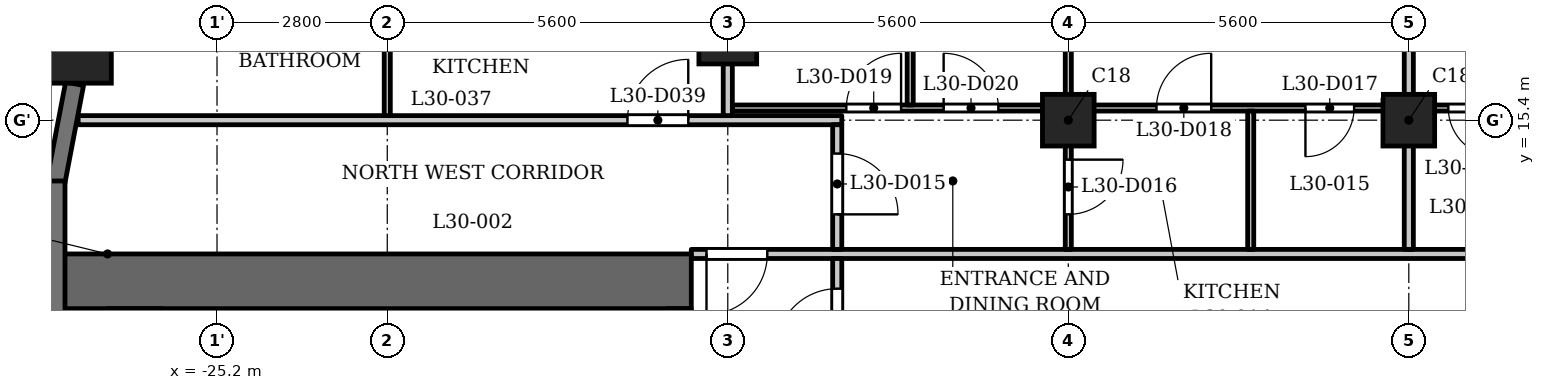
"""IFC4 building model, lengths in metres.
Left out: names, types, materials, properties, quantities, classifications, styles, units other than length and angle.
Written with IfcOpenShell. Run it as: python <this file> out.ifc"""

import sys

from ifc_helpers import new_model, si_unit, direction, frame, frame_2d, origin, origin_2d, place, context, subcontext, project, spatial, rectangle, extrude, element, fill, save


model = new_model("IFC4")
c1 = context("Model", 3, precision=1e-05, world=origin(), true_north=direction((0.0, 1.0)))
c2 = subcontext(c1, "Body", "Model", "MODEL_VIEW")
j1 = project(units=[si_unit("LENGTHUNIT", "METRE"), si_unit("PLANEANGLEUNIT", "RADIAN")], contexts=[c1])
p1 = place(None, origin())
s1 = spatial("IfcSite", under=j1, at=p1, CompositionType="ELEMENT")
p2 = place(p1, origin())
s2 = spatial("IfcBuilding", under=s1, at=p2, CompositionType="ELEMENT")
p3 = place(p2, frame((0.0, 0.0, 118.3)))
s3 = spatial("IfcBuildingStorey", under=s2, at=p3, CompositionType="ELEMENT", Elevation=118.3)
p4 = place(p3, frame((-27.538, 16.609, 0.0), z_axis=(0.0, 0.0, 1.0), x_axis=(1.0, 0.0, 0.0)))
e1 = element("IfcColumn", 1, at=p4, inside=s3, PredefinedType="COLUMN", context=c2, shape_type="SweptSolid", body=[
    extrude(rectangle(XDim=1.2, YDim=1.2, at=origin_2d()), origin(), (0.0, 0.0, 1.0), 3.5),
])
p5 = place(p3, frame((-16.8, 16.8, 0.0), z_axis=(0.0, 0.0, 1.0), x_axis=(1.0, 0.0, 0.0)))
e2 = element("IfcColumn", 2, at=p5, inside=s3, PredefinedType="COLUMN", context=c2, shape_type="SweptSolid", body=[
    extrude(rectangle(XDim=0.95, YDim=0.95, at=origin_2d()), origin(), (0.0, 0.0, 1.0), 3.5),
])
for number, where, z_axis, x_axis in (
    (3, (-11.2, 15.4, 0.0), (0.0, 0.0, 1.0), (1.0, 0.0, 0.0)),
    (4, (-5.6, 15.4, 0.0), (0.0, 0.0, 1.0), (1.0, 0.0, 0.0)),
):
    element("IfcColumn", number, at=place(p3, frame(where, z_axis=z_axis, x_axis=x_axis)), inside=s3, PredefinedType="COLUMN", context=c2, shape_type="SweptSolid", body=[
        extrude(rectangle(XDim=0.85, YDim=0.85, at=origin_2d()), origin(), (0.0, 0.0, 1.0), 3.5),
    ])
p6 = place(p3, frame((-27.542, 15.999, 0.0), z_axis=(0.0, 0.0, 1.0), x_axis=(-0.187349172861, -0.982293381546, 0.0)))
e5 = element("IfcWall", 5, at=p6, inside=s3, PredefinedType="SOLIDWALL", context=c2, shape_type="SweptSolid", body=[
    extrude(rectangle(XDim=1.656, YDim=0.3, at=frame_2d((0.828, 0.0))), origin(), (0.0, 0.0, 1.0), 2.4),
])
p7 = place(p3, frame((-27.85, 14.4, 0.0), z_axis=(0.0, 0.0, 1.0), x_axis=(0.0, -1.0, 0.0)))
e6 = element("IfcWall", 6, at=p7, inside=s3, PredefinedType="SOLIDWALL", context=c2, shape_type="SweptSolid", body=[
    extrude(rectangle(XDim=2.6, YDim=0.3, at=frame_2d((1.3, 0.0))), origin(), (0.0, 0.0, 1.0), 2.4),
])
p8 = place(p3, frame((-17.4, 12.75, 0.0), z_axis=(0.0, 0.0, 1.0), x_axis=(-1.0, 0.0, 0.0)))
e7 = element("IfcWall", 7, at=p8, inside=s3, PredefinedType="SHEAR", context=c2, shape_type="SweptSolid", body=[
    extrude(rectangle(XDim=10.4, YDim=0.9, at=frame_2d((5.2, 0.0))), origin(), (0.0, 0.0, 1.0), 3.2),
])
p9 = place(p3, frame((-17.6, -12.3, 0.0), z_axis=(0.0, 0.0, 1.0), x_axis=(0.0, 1.0, 0.0)))
e8 = element("IfcWall", 8, at=p9, inside=s3, PredefinedType="SHEAR", context=c2, shape_type="SweptSolid", body=[
    extrude(rectangle(XDim=24.6, YDim=0.4, at=frame_2d((12.3, 0.0))), origin(), (0.0, 0.0, 1.0), 3.2),
])
p10 = place(p9, frame((6.0, 0.0, 0.0)))
e9 = element("IfcOpeningElement", 9, at=p10, cuts=e8, PredefinedType="OPENING", context=c2, shape_type="SweptSolid", body=[
    extrude(rectangle(XDim=1.1, YDim=2.1, at=frame_2d((0.55, 1.05))), frame((0.0, 0.21, 0.0), z_axis=(0.0, -1.0, 0.0), x_axis=(1.0, 0.0, 0.0)), (0.0, 0.0, 1.0), 0.42),
])
p11 = place(p9, frame((8.4, 0.0, 0.0)))
e10 = element("IfcOpeningElement", 10, at=p11, cuts=e8, PredefinedType="OPENING", context=c2, shape_type="SweptSolid", body=[
    extrude(rectangle(XDim=1.1, YDim=2.1, at=frame_2d((0.55, 1.05))), frame((0.0, 0.21, 0.0), z_axis=(0.0, -1.0, 0.0), x_axis=(1.0, 0.0, 0.0)), (0.0, 0.0, 1.0), 0.42),
])
p12 = place(p9, frame((10.8, 0.0, 0.0)))
e11 = element("IfcOpeningElement", 11, at=p12, cuts=e8, PredefinedType="OPENING", context=c2, shape_type="SweptSolid", body=[
    extrude(rectangle(XDim=1.1, YDim=2.1, at=frame_2d((0.55, 1.05))), frame((0.0, 0.21, 0.0), z_axis=(0.0, -1.0, 0.0), x_axis=(1.0, 0.0, 0.0)), (0.0, 0.0, 1.0), 0.42),
])
p13 = place(p9, frame((16.75, 0.0, 0.0)))
e12 = element("IfcOpeningElement", 12, at=p13, cuts=e8, PredefinedType="OPENING", context=c2, shape_type="SweptSolid", body=[
    extrude(rectangle(XDim=0.9, YDim=2.1, at=frame_2d((0.45, 1.05))), frame((0.0, 0.21, 0.0), z_axis=(0.0, -1.0, 0.0), x_axis=(1.0, 0.0, 0.0)), (0.0, 0.0, 1.0), 0.42),
])
p14 = place(p9, frame((22.8, 0.0, 0.0)))
e13 = element("IfcOpeningElement", 13, at=p14, cuts=e8, PredefinedType="OPENING", context=c2, shape_type="SweptSolid", body=[
    extrude(rectangle(XDim=1.1, YDim=2.1, at=frame_2d((0.55, 1.05))), frame((0.0, 0.21, 0.0), z_axis=(0.0, -1.0, 0.0), x_axis=(1.0, 0.0, 0.0)), (0.0, 0.0, 1.0), 0.42),
])
p15 = place(p9, frame((0.7, 0.0, 0.0)))
e14 = element("IfcOpeningElement", 14, at=p15, cuts=e8, PredefinedType="OPENING", context=c2, shape_type="SweptSolid", body=[
    extrude(rectangle(XDim=1.1, YDim=2.1, at=frame_2d((0.55, 1.05))), frame((0.0, 0.21, 0.0), z_axis=(0.0, -1.0, 0.0), x_axis=(1.0, 0.0, 0.0)), (0.0, 0.0, 1.0), 0.42),
])
p16 = place(p9, frame((12.775, 0.0, 0.0)))
e15 = element("IfcOpeningElement", 15, at=p16, cuts=e8, PredefinedType="OPENING", context=c2, shape_type="SweptSolid", body=[
    extrude(rectangle(XDim=1.8, YDim=2.1, at=frame_2d((0.9, 1.05))), frame((0.0, 0.21, 0.0), z_axis=(0.0, -1.0, 0.0), x_axis=(1.0, 0.0, 0.0)), (0.0, 0.0, 1.0), 0.42),
])
p17 = place(p3, frame((-26.55, -12.3, 0.0), z_axis=(0.0, 0.0, 1.0), x_axis=(0.0, 1.0, 0.0)))
e16 = element("IfcWall", 16, at=p17, inside=s3, PredefinedType="SHEAR", context=c2, shape_type="SweptSolid", body=[
    extrude(rectangle(XDim=24.6, YDim=0.9, at=frame_2d((12.3, 0.0))), origin(), (0.0, 0.0, 1.0), 3.2),
])
p18 = place(p3, frame((-23.55, 9.8, 0.0), z_axis=(0.0, 0.0, 1.0), x_axis=(0.0, 1.0, 0.0)))
e17 = element("IfcWall", 17, at=p18, inside=s3, PredefinedType="PARTITIONING", context=c2, shape_type="SweptSolid", body=[
    extrude(rectangle(XDim=2.5, YDim=0.2, at=frame_2d((1.25, 0.0))), origin(), (0.0, 0.0, 1.0), 3.2),
])
p19 = place(p18, frame((0.8, 0.0, 0.0)))
e18 = element("IfcOpeningElement", 18, at=p19, cuts=e17, PredefinedType="OPENING", context=c2, shape_type="SweptSolid", body=[
    extrude(rectangle(XDim=0.9, YDim=2.1, at=frame_2d((0.45, 1.05))), frame((0.0, 0.11, 0.0), z_axis=(0.0, -1.0, 0.0), x_axis=(1.0, 0.0, 0.0)), (0.0, 0.0, 1.0), 0.22),
])
p20 = place(p3, frame((-17.4, 13.2, 0.0), z_axis=(0.0, 0.0, 1.0), x_axis=(1.0, 0.0, 0.0)))
e19 = element("IfcWall", 19, at=p20, inside=s3, PredefinedType="PARTITIONING", context=c2, shape_type="SweptSolid", body=[
    extrude(rectangle(XDim=34.8, YDim=0.15, at=frame_2d((17.4, 0.0))), origin(), (0.0, 0.0, 1.0), 3.2),
])
p21 = place(p20, frame((0.25, 0.0, 0.0)))
e20 = element("IfcOpeningElement", 20, at=p21, cuts=e19, PredefinedType="OPENING", context=c2, shape_type="SweptSolid", body=[
    extrude(rectangle(XDim=1.0, YDim=2.1, at=frame_2d((0.5, 1.05))), frame((0.0, 0.085, 0.0), z_axis=(0.0, -1.0, 0.0), x_axis=(1.0, 0.0, 0.0)), (0.0, 0.0, 1.0), 0.17),
])
p22 = place(p20, frame((33.65, 0.0, 0.0)))
e21 = element("IfcOpeningElement", 21, at=p22, cuts=e19, PredefinedType="OPENING", context=c2, shape_type="SweptSolid", body=[
    extrude(rectangle(XDim=1.0, YDim=2.1, at=frame_2d((0.5, 1.05))), frame((0.0, 0.085, 0.0), z_axis=(0.0, -1.0, 0.0), x_axis=(1.0, 0.0, 0.0)), (0.0, 0.0, 1.0), 0.17),
])
p23 = place(p20, frame((15.75, 0.0, 0.0)))
e22 = element("IfcOpeningElement", 22, at=p23, cuts=e19, PredefinedType="OPENING", context=c2, shape_type="SweptSolid", body=[
    extrude(rectangle(XDim=1.0, YDim=2.1, at=frame_2d((0.5, 1.05))), frame((0.0, 0.085, 0.0), z_axis=(0.0, -1.0, 0.0), x_axis=(1.0, 0.0, 0.0)), (0.0, 0.0, 1.0), 0.17),
])
p24 = place(p20, frame((18.1, 0.0, 0.0)))
e23 = element("IfcOpeningElement", 23, at=p24, cuts=e19, PredefinedType="OPENING", context=c2, shape_type="SweptSolid", body=[
    extrude(rectangle(XDim=1.0, YDim=2.1, at=frame_2d((0.5, 1.05))), frame((0.0, 0.085, 0.0), z_axis=(0.0, -1.0, 0.0), x_axis=(1.0, 0.0, 0.0)), (0.0, 0.0, 1.0), 0.17),
])
p25 = place(p20, frame((23.55, 0.0, 0.0)))
e24 = element("IfcOpeningElement", 24, at=p25, cuts=e19, PredefinedType="OPENING", context=c2, shape_type="SweptSolid", body=[
    extrude(rectangle(XDim=1.0, YDim=2.1, at=frame_2d((0.5, 1.05))), frame((0.0, 0.085, 0.0), z_axis=(0.0, -1.0, 0.0), x_axis=(1.0, 0.0, 0.0)), (0.0, 0.0, 1.0), 0.17),
])
p26 = place(p3, frame((-27.484, 15.4, 0.0), z_axis=(0.0, 0.0, 1.0), x_axis=(1.0, 0.0, 0.0)))
e25 = element("IfcWall", 25, at=p26, inside=s3, PredefinedType="PARTITIONING", context=c2, shape_type="SweptSolid", body=[
    extrude(rectangle(XDim=12.559, YDim=0.15, at=frame_2d((6.279, 0.0))), origin(), (0.0, 0.0, 1.0), 3.2),
])
p27 = place(p26, frame((9.034, 0.0, 0.0)))
e26 = element("IfcOpeningElement", 26, at=p27, cuts=e25, PredefinedType="OPENING", context=c2, shape_type="SweptSolid", body=[
    extrude(rectangle(XDim=1.0, YDim=2.1, at=frame_2d((0.5, 1.05))), frame((0.0, 0.085, 0.0), z_axis=(0.0, -1.0, 0.0), x_axis=(1.0, 0.0, 0.0)), (0.0, 0.0, 1.0), 0.17),
])
p28 = place(p3, frame((-16.725, 15.6, 0.0), z_axis=(0.0, 0.0, 1.0), x_axis=(1.0, 0.0, 0.0)))
e27 = element("IfcWall", 27, at=p28, inside=s3, PredefinedType="PARTITIONING", context=c2, shape_type="SweptSolid", body=[
    extrude(rectangle(XDim=33.45, YDim=0.1, at=frame_2d((16.725, 0.0))), origin(), (0.0, 0.0, 1.0), 3.2),
])
p29 = place(p28, frame((9.425, 0.0, 0.0)))
e28 = element("IfcOpeningElement", 28, at=p29, cuts=e27, PredefinedType="OPENING", context=c2, shape_type="SweptSolid", body=[
    extrude(rectangle(XDim=0.8, YDim=2.1, at=frame_2d((0.4, 1.05))), frame((0.0, 0.06, 0.0), z_axis=(0.0, -1.0, 0.0), x_axis=(1.0, 0.0, 0.0)), (0.0, 0.0, 1.0), 0.12),
])
p30 = place(p28, frame((6.975, 0.0, 0.0)))
e29 = element("IfcOpeningElement", 29, at=p30, cuts=e27, PredefinedType="OPENING", context=c2, shape_type="SweptSolid", body=[
    extrude(rectangle(XDim=0.9, YDim=2.1, at=frame_2d((0.45, 1.05))), frame((0.0, 0.06, 0.0), z_axis=(0.0, -1.0, 0.0), x_axis=(1.0, 0.0, 0.0)), (0.0, 0.0, 1.0), 0.12),
])
p31 = place(p28, frame((1.875, 0.0, 0.0)))
e30 = element("IfcOpeningElement", 30, at=p31, cuts=e27, PredefinedType="OPENING", context=c2, shape_type="SweptSolid", body=[
    extrude(rectangle(XDim=0.9, YDim=2.1, at=frame_2d((0.45, 1.05))), frame((0.0, 0.06, 0.0), z_axis=(0.0, -1.0, 0.0), x_axis=(1.0, 0.0, 0.0)), (0.0, 0.0, 1.0), 0.12),
])
p32 = place(p28, frame((3.475, 0.0, 0.0)))
e31 = element("IfcOpeningElement", 31, at=p32, cuts=e27, PredefinedType="OPENING", context=c2, shape_type="SweptSolid", body=[
    extrude(rectangle(XDim=0.9, YDim=2.1, at=frame_2d((0.45, 1.05))), frame((0.0, 0.06, 0.0), z_axis=(0.0, -1.0, 0.0), x_axis=(1.0, 0.0, 0.0)), (0.0, 0.0, 1.0), 0.12),
])
p33 = place(p28, frame((11.775, 0.0, 0.0)))
e32 = element("IfcOpeningElement", 32, at=p33, cuts=e27, PredefinedType="OPENING", context=c2, shape_type="SweptSolid", body=[
    extrude(rectangle(XDim=0.8, YDim=2.1, at=frame_2d((0.4, 1.05))), frame((0.0, 0.06, 0.0), z_axis=(0.0, -1.0, 0.0), x_axis=(1.0, 0.0, 0.0)), (0.0, 0.0, 1.0), 0.12),
])
p34 = place(p28, frame((14.175, 0.0, 0.0)))
e33 = element("IfcOpeningElement", 33, at=p34, cuts=e27, PredefinedType="OPENING", context=c2, shape_type="SweptSolid", body=[
    extrude(rectangle(XDim=0.9, YDim=2.1, at=frame_2d((0.45, 1.05))), frame((0.0, 0.06, 0.0), z_axis=(0.0, -1.0, 0.0), x_axis=(1.0, 0.0, 0.0)), (0.0, 0.0, 1.0), 0.12),
])
p35 = place(p28, frame((20.725, 0.0, 0.0)))
e34 = element("IfcOpeningElement", 34, at=p35, cuts=e27, PredefinedType="OPENING", context=c2, shape_type="SweptSolid", body=[
    extrude(rectangle(XDim=0.8, YDim=2.1, at=frame_2d((0.4, 1.05))), frame((0.0, 0.06, 0.0), z_axis=(0.0, -1.0, 0.0), x_axis=(1.0, 0.0, 0.0)), (0.0, 0.0, 1.0), 0.12),
])
p36 = place(p28, frame((18.375, 0.0, 0.0)))
e35 = element("IfcOpeningElement", 35, at=p36, cuts=e27, PredefinedType="OPENING", context=c2, shape_type="SweptSolid", body=[
    extrude(rectangle(XDim=0.9, YDim=2.1, at=frame_2d((0.45, 1.05))), frame((0.0, 0.06, 0.0), z_axis=(0.0, -1.0, 0.0), x_axis=(1.0, 0.0, 0.0)), (0.0, 0.0, 1.0), 0.12),
])
p37 = place(p28, frame((26.425, 0.0, 0.0)))
e36 = element("IfcOpeningElement", 36, at=p37, cuts=e27, PredefinedType="OPENING", context=c2, shape_type="SweptSolid", body=[
    extrude(rectangle(XDim=0.8, YDim=2.1, at=frame_2d((0.4, 1.05))), frame((0.0, 0.06, 0.0), z_axis=(0.0, -1.0, 0.0), x_axis=(1.0, 0.0, 0.0)), (0.0, 0.0, 1.0), 0.12),
])
p38 = place(p28, frame((23.875, 0.0, 0.0)))
e37 = element("IfcOpeningElement", 37, at=p38, cuts=e27, PredefinedType="OPENING", context=c2, shape_type="SweptSolid", body=[
    extrude(rectangle(XDim=0.9, YDim=2.1, at=frame_2d((0.45, 1.05))), frame((0.0, 0.06, 0.0), z_axis=(0.0, -1.0, 0.0), x_axis=(1.0, 0.0, 0.0)), (0.0, 0.0, 1.0), 0.12),
])
p39 = place(p28, frame((28.575, 0.0, 0.0)))
e38 = element("IfcOpeningElement", 38, at=p39, cuts=e27, PredefinedType="OPENING", context=c2, shape_type="SweptSolid", body=[
    extrude(rectangle(XDim=0.8, YDim=2.1, at=frame_2d((0.4, 1.05))), frame((0.0, 0.06, 0.0), z_axis=(0.0, -1.0, 0.0), x_axis=(1.0, 0.0, 0.0)), (0.0, 0.0, 1.0), 0.12),
])
p40 = place(p28, frame((30.725, 0.0, 0.0)))
e39 = element("IfcOpeningElement", 39, at=p40, cuts=e27, PredefinedType="OPENING", context=c2, shape_type="SweptSolid", body=[
    extrude(rectangle(XDim=0.9, YDim=2.1, at=frame_2d((0.45, 1.05))), frame((0.0, 0.06, 0.0), z_axis=(0.0, -1.0, 0.0), x_axis=(1.0, 0.0, 0.0)), (0.0, 0.0, 1.0), 0.12),
])
p41 = place(p3, frame((-22.4, 15.475, 0.0), z_axis=(0.0, 0.0, 1.0), x_axis=(0.0, 1.0, 0.0)))
e40 = element("IfcWall", 40, at=p41, inside=s3, PredefinedType="PARTITIONING", context=c2, shape_type="SweptSolid", body=[
    extrude(rectangle(XDim=2.275, YDim=0.1, at=frame_2d((1.137, 0.0))), origin(), (0.0, 0.0, 1.0), 3.2),
])
p42 = place(p3, frame((-16.8, 15.475, 0.0), z_axis=(0.0, 0.0, 1.0), x_axis=(0.0, 1.0, 0.0)))
e41 = element("IfcWall", 41, at=p42, inside=s3, PredefinedType="PARTITIONING", context=c2, shape_type="SweptSolid", body=[
    extrude(rectangle(XDim=7.505, YDim=0.15, at=frame_2d((3.752, 0.0))), origin(), (0.0, 0.0, 1.0), 3.2),
])
p43 = place(p3, frame((-15.0, 6.769, 0.0), z_axis=(0.0, 0.0, 1.0), x_axis=(0.0, 1.0, 0.0)))
e42 = element("IfcWall", 42, at=p43, inside=s3, PredefinedType="PARTITIONING", context=c2, shape_type="SweptSolid", body=[
    extrude(rectangle(XDim=6.356, YDim=0.15, at=frame_2d((3.178, 0.0))), origin(), (0.0, 0.0, 1.0), 3.2),
])
p44 = place(p43, frame((4.86, 0.0, 0.0)))
e43 = element("IfcOpeningElement", 43, at=p44, cuts=e42, PredefinedType="OPENING", context=c2, shape_type="SweptSolid", body=[
    extrude(rectangle(XDim=1.0, YDim=2.1, at=frame_2d((0.5, 1.05))), frame((0.0, 0.085, 0.0), z_axis=(0.0, -1.0, 0.0), x_axis=(1.0, 0.0, 0.0)), (0.0, 0.0, 1.0), 0.17),
])
p45 = place(p3, frame((-15.0, 13.275, 0.0), z_axis=(0.0, 0.0, 1.0), x_axis=(0.0, 1.0, 0.0)))
e44 = element("IfcWall", 44, at=p45, inside=s3, PredefinedType="PARTITIONING", context=c2, shape_type="SweptSolid", body=[
    extrude(rectangle(XDim=2.05, YDim=0.15, at=frame_2d((1.025, 0.0))), origin(), (0.0, 0.0, 1.0), 3.2),
])
p46 = place(p45, frame((0.576, 0.0, 0.0)))
e45 = element("IfcOpeningElement", 45, at=p46, cuts=e44, PredefinedType="OPENING", context=c2, shape_type="SweptSolid", body=[
    extrude(rectangle(XDim=1.0, YDim=2.1, at=frame_2d((0.5, 1.05))), frame((0.0, 0.085, 0.0), z_axis=(0.0, -1.0, 0.0), x_axis=(1.0, 0.0, 0.0)), (0.0, 0.0, 1.0), 0.17),
])
p47 = place(p3, frame((-13.8, 15.65, 0.0), z_axis=(0.0, 0.0, 1.0), x_axis=(0.0, 1.0, 0.0)))
e46 = element("IfcWall", 46, at=p47, inside=s3, PredefinedType="PARTITIONING", context=c2, shape_type="SweptSolid", body=[
    extrude(rectangle(XDim=6.43, YDim=0.1, at=frame_2d((3.215, 0.0))), origin(), (0.0, 0.0, 1.0), 3.2),
])
p48 = place(p3, frame((-11.2, 13.275, 0.0), z_axis=(0.0, 0.0, 1.0), x_axis=(0.0, 1.0, 0.0)))
e47 = element("IfcWall", 47, at=p48, inside=s3, PredefinedType="PARTITIONING", context=c2, shape_type="SweptSolid", body=[
    extrude(rectangle(XDim=2.275, YDim=0.1, at=frame_2d((1.138, 0.0))), origin(), (0.0, 0.0, 1.0), 3.2),
])
p49 = place(p48, frame((0.576, 0.0, 0.0)))
e48 = element("IfcOpeningElement", 48, at=p49, cuts=e47, PredefinedType="OPENING", context=c2, shape_type="SweptSolid", body=[
    extrude(rectangle(XDim=0.9, YDim=2.1, at=frame_2d((0.45, 1.05))), frame((0.0, 0.06, 0.0), z_axis=(0.0, -1.0, 0.0), x_axis=(1.0, 0.0, 0.0)), (0.0, 0.0, 1.0), 0.12),
])
p50 = place(p3, frame((-11.2, 15.65, 0.0), z_axis=(0.0, 0.0, 1.0), x_axis=(0.0, 1.0, 0.0)))
e49 = element("IfcWall", 49, at=p50, inside=s3, PredefinedType="PARTITIONING", context=c2, shape_type="SweptSolid", body=[
    extrude(rectangle(XDim=7.33, YDim=0.1, at=frame_2d((3.665, 0.0))), origin(), (0.0, 0.0, 1.0), 3.2),
])
p51 = place(p3, frame((-8.2, 13.275, 0.0), z_axis=(0.0, 0.0, 1.0), x_axis=(0.0, 1.0, 0.0)))
e50 = element("IfcWall", 50, at=p51, inside=s3, PredefinedType="PARTITIONING", context=c2, shape_type="SweptSolid", body=[
    extrude(rectangle(XDim=2.275, YDim=0.1, at=frame_2d((1.138, 0.0))), origin(), (0.0, 0.0, 1.0), 3.2),
])
p52 = place(p3, frame((-5.6, 13.275, 0.0), z_axis=(0.0, 0.0, 1.0), x_axis=(0.0, 1.0, 0.0)))
e51 = element("IfcWall", 51, at=p52, inside=s3, PredefinedType="PARTITIONING", context=c2, shape_type="SweptSolid", body=[
    extrude(rectangle(XDim=2.275, YDim=0.15, at=frame_2d((1.138, 0.0))), origin(), (0.0, 0.0, 1.0), 3.2),
])
p53 = place(p3, frame((-5.6, 15.65, 0.0), z_axis=(0.0, 0.0, 1.0), x_axis=(0.0, 1.0, 0.0)))
e52 = element("IfcWall", 52, at=p53, inside=s3, PredefinedType="PARTITIONING", context=c2, shape_type="SweptSolid", body=[
    extrude(rectangle(XDim=7.33, YDim=0.15, at=frame_2d((3.665, 0.0))), origin(), (0.0, 0.0, 1.0), 3.2),
])
p54 = place(p44, origin())
e53 = element("IfcDoor", 53, at=p54, inside=s3, OperationType="SINGLE_SWING_RIGHT", PredefinedType="DOOR", context=c2, shape_type="SweptSolid", body=[
    extrude(rectangle(XDim=1.0, YDim=2.1, at=frame_2d((0.5, 1.05))), frame((0.0, 0.025, 0.0), z_axis=(0.0, -1.0, 0.0), x_axis=(1.0, 0.0, 0.0)), (0.0, 0.0, 1.0), 0.05),
])
fill(e43, e53)
p55 = place(p21, origin())
e54 = element("IfcDoor", 54, at=p55, inside=s3, OperationType="SINGLE_SWING_LEFT", PredefinedType="DOOR", context=c2, shape_type="SweptSolid", body=[
    extrude(rectangle(XDim=1.0, YDim=2.1, at=frame_2d((0.5, 1.05))), frame((0.0, 0.025, 0.0), z_axis=(0.0, -1.0, 0.0), x_axis=(1.0, 0.0, 0.0)), (0.0, 0.0, 1.0), 0.05),
])
fill(e20, e54)
p56 = place(p46, origin())
e55 = element("IfcDoor", 55, at=p56, inside=s3, OperationType="SINGLE_SWING_LEFT", PredefinedType="DOOR", context=c2, shape_type="SweptSolid", body=[
    extrude(rectangle(XDim=1.0, YDim=2.1, at=frame_2d((0.5, 1.05))), frame((0.0, 0.025, 0.0), z_axis=(0.0, -1.0, 0.0), x_axis=(1.0, 0.0, 0.0)), (0.0, 0.0, 1.0), 0.05),
])
fill(e45, e55)
p57 = place(p49, origin())
e56 = element("IfcDoor", 56, at=p57, inside=s3, OperationType="SINGLE_SWING_RIGHT", PredefinedType="DOOR", context=c2, shape_type="SweptSolid", body=[
    extrude(rectangle(XDim=0.9, YDim=2.1, at=frame_2d((0.45, 1.05))), frame((0.0, 0.025, 0.0), z_axis=(0.0, -1.0, 0.0), x_axis=(1.0, 0.0, 0.0)), (0.0, 0.0, 1.0), 0.05),
])
fill(e48, e56)
p58 = place(p29, origin())
e57 = element("IfcDoor", 57, at=p58, inside=s3, OperationType="SINGLE_SWING_LEFT", PredefinedType="DOOR", context=c2, shape_type="SweptSolid", body=[
    extrude(rectangle(XDim=0.8, YDim=2.1, at=frame_2d((0.4, 1.05))), frame((0.0, 0.025, 0.0), z_axis=(0.0, -1.0, 0.0), x_axis=(1.0, 0.0, 0.0)), (0.0, 0.0, 1.0), 0.05),
])
fill(e28, e57)
p59 = place(p30, origin())
e58 = element("IfcDoor", 58, at=p59, inside=s3, OperationType="SINGLE_SWING_LEFT", PredefinedType="DOOR", context=c2, shape_type="SweptSolid", body=[
    extrude(rectangle(XDim=0.9, YDim=2.1, at=frame_2d((0.45, 1.05))), frame((0.0, 0.025, 0.0), z_axis=(0.0, -1.0, 0.0), x_axis=(1.0, 0.0, 0.0)), (0.0, 0.0, 1.0), 0.05),
])
fill(e29, e58)
p60 = place(p31, origin())
e59 = element("IfcDoor", 59, at=p60, inside=s3, OperationType="SINGLE_SWING_LEFT", PredefinedType="DOOR", context=c2, shape_type="SweptSolid", body=[
    extrude(rectangle(XDim=0.9, YDim=2.1, at=frame_2d((0.45, 1.05))), frame((0.0, 0.025, 0.0), z_axis=(0.0, -1.0, 0.0), x_axis=(1.0, 0.0, 0.0)), (0.0, 0.0, 1.0), 0.05),
])
fill(e30, e59)
p61 = place(p32, origin())
e60 = element("IfcDoor", 60, at=p61, inside=s3, OperationType="SINGLE_SWING_RIGHT", PredefinedType="DOOR", context=c2, shape_type="SweptSolid", body=[
    extrude(rectangle(XDim=0.9, YDim=2.1, at=frame_2d((0.45, 1.05))), frame((0.0, 0.025, 0.0), z_axis=(0.0, -1.0, 0.0), x_axis=(1.0, 0.0, 0.0)), (0.0, 0.0, 1.0), 0.05),
])
fill(e31, e60)
p62 = place(p33, origin())
e61 = element("IfcDoor", 61, at=p62, inside=s3, OperationType="SINGLE_SWING_RIGHT", PredefinedType="DOOR", context=c2, shape_type="SweptSolid", body=[
    extrude(rectangle(XDim=0.8, YDim=2.1, at=frame_2d((0.4, 1.05))), frame((0.0, 0.025, 0.0), z_axis=(0.0, -1.0, 0.0), x_axis=(1.0, 0.0, 0.0)), (0.0, 0.0, 1.0), 0.05),
])
fill(e32, e61)
p63 = place(p27, origin())
e62 = element("IfcDoor", 62, at=p63, inside=s3, OperationType="SINGLE_SWING_LEFT", PredefinedType="DOOR", context=c2, shape_type="SweptSolid", body=[
    extrude(rectangle(XDim=1.0, YDim=2.1, at=frame_2d((0.5, 1.05))), frame((0.0, 0.025, 0.0), z_axis=(0.0, -1.0, 0.0), x_axis=(1.0, 0.0, 0.0)), (0.0, 0.0, 1.0), 0.05),
])
fill(e26, e62)
save(model, sys.argv[1])
